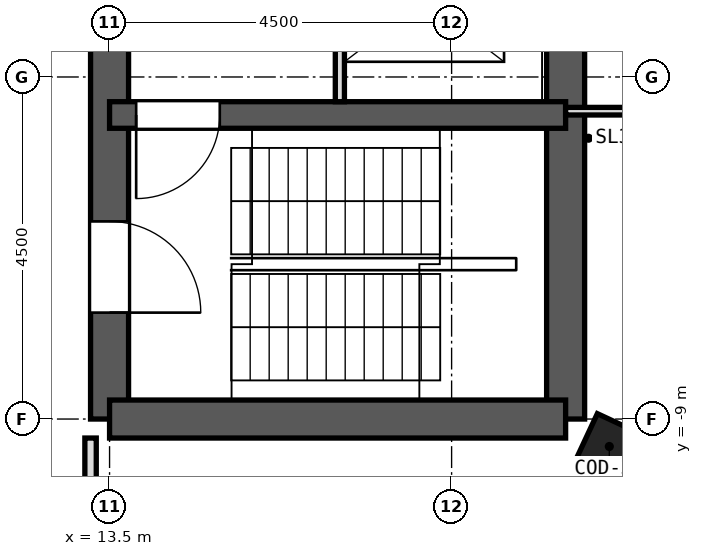
"""IFC4 building model, lengths in metres.
Left out: names, types, materials, properties, quantities, classifications, styles, units other than length and angle.
Written with IfcOpenShell. Run it as: python <this file> out.ifc"""

import sys

from ifc_helpers import new_model, si_unit, direction, frame, frame_2d, origin, origin_2d, place, context, subcontext, project, spatial, polyline, rectangle, outline, extrude, element, fill, save


model = new_model("IFC4")
c1 = context("Model", 3, precision=1e-05, world=origin(), true_north=direction((0.0, 1.0)))
c2 = subcontext(c1, "Body", "Model", "MODEL_VIEW")
j1 = project(units=[si_unit("LENGTHUNIT", "METRE"), si_unit("PLANEANGLEUNIT", "RADIAN")], contexts=[c1])
p1 = place(None, origin())
s1 = spatial("IfcSite", under=j1, at=p1, CompositionType="ELEMENT")
p2 = place(p1, origin())
s2 = spatial("IfcBuilding", under=s1, at=p2, CompositionType="ELEMENT")
p3 = place(p2, frame((0.0, 0.0, 224.7)))
s3 = spatial("IfcBuildingStorey", under=s2, at=p3, CompositionType="ELEMENT", Elevation=224.7)
p4 = place(p3, frame((20.075, -9.361, -0.55), z_axis=(0.0, 0.0, 1.0), x_axis=(0.906307787037, -0.422618261741, 0.0)))
e1 = element("IfcColumn", 1, at=p4, inside=s3, PredefinedType="COLUMN", context=c2, shape_type="SweptSolid", body=[
    extrude(rectangle(XDim=0.65, YDim=0.65, at=origin_2d()), origin(), (0.0, 0.0, 1.0), 5.55),
])
p5 = place(p3, frame((13.5, -9.0, 0.0), z_axis=(0.0, 0.0, 1.0), x_axis=(0.0, 1.0, 0.0)))
e2 = element("IfcWall", 2, at=p5, inside=s3, PredefinedType="SHEAR", context=c2, shape_type="SweptSolid", body=[
    extrude(rectangle(XDim=18.0, YDim=0.5, at=frame_2d((9.0, 0.0))), origin(), (0.0, 0.0, 1.0), 5.0),
])
p6 = place(p5, frame((15.4, 0.0, 0.0)))
e3 = element("IfcOpeningElement", 3, at=p6, cuts=e2, PredefinedType="OPENING", context=c2, shape_type="SweptSolid", body=[
    extrude(rectangle(XDim=1.2, YDim=2.1, at=frame_2d((0.6, 1.05))), frame((0.0, 0.262, 0.0), z_axis=(0.0, -1.0, 0.0), x_axis=(1.0, 0.0, 0.0)), (0.0, 0.0, 1.0), 0.524),
])
p7 = place(p5, frame((1.4, 0.0, 0.0)))
e4 = element("IfcOpeningElement", 4, at=p7, cuts=e2, PredefinedType="OPENING", context=c2, shape_type="SweptSolid", body=[
    extrude(rectangle(XDim=1.2, YDim=2.1, at=frame_2d((0.6, 1.05))), frame((0.0, 0.262, 0.0), z_axis=(0.0, -1.0, 0.0), x_axis=(1.0, 0.0, 0.0)), (0.0, 0.0, 1.0), 0.524),
])
p8 = place(p5, frame((7.5, 0.0, 0.0)))
e5 = element("IfcOpeningElement", 5, at=p8, cuts=e2, PredefinedType="OPENING", context=c2, shape_type="SweptSolid", body=[
    extrude(rectangle(XDim=3.0, YDim=2.4, at=frame_2d((1.5, 1.2))), frame((0.0, 0.262, 0.0), z_axis=(0.0, -1.0, 0.0), x_axis=(1.0, 0.0, 0.0)), (0.0, 0.0, 1.0), 0.524),
])
p9 = place(p3, frame((19.5, -9.0, 0.0), z_axis=(0.0, 0.0, 1.0), x_axis=(0.0, 1.0, 0.0)))
e6 = element("IfcWall", 6, at=p9, inside=s3, PredefinedType="SHEAR", context=c2, shape_type="SweptSolid", body=[
    extrude(rectangle(XDim=18.0, YDim=0.5, at=frame_2d((9.0, 0.0))), origin(), (0.0, 0.0, 1.0), 5.0),
])
p10 = place(p9, frame((9.45, 0.0, 0.0)))
e7 = element("IfcOpeningElement", 7, at=p10, cuts=e6, PredefinedType="OPENING", context=c2, shape_type="SweptSolid", body=[
    extrude(rectangle(XDim=0.9, YDim=2.1, at=frame_2d((0.45, 1.05))), frame((0.0, 0.262, 0.0), z_axis=(0.0, -1.0, 0.0), x_axis=(1.0, 0.0, 0.0)), (0.0, 0.0, 1.0), 0.524),
])
p11 = place(p9, frame((7.65, 0.0, 0.0)))
e8 = element("IfcOpeningElement", 8, at=p11, cuts=e6, PredefinedType="OPENING", context=c2, shape_type="SweptSolid", body=[
    extrude(rectangle(XDim=0.9, YDim=2.1, at=frame_2d((0.45, 1.05))), frame((0.0, 0.262, 0.0), z_axis=(0.0, -1.0, 0.0), x_axis=(1.0, 0.0, 0.0)), (0.0, 0.0, 1.0), 0.524),
])
p12 = place(p3, frame((13.5, -9.0, 0.0), z_axis=(0.0, 0.0, 1.0), x_axis=(1.0, 0.0, 0.0)))
e9 = element("IfcWall", 9, at=p12, inside=s3, PredefinedType="SHEAR", context=c2, shape_type="SweptSolid", body=[
    extrude(rectangle(XDim=6.0, YDim=0.5, at=frame_2d((3.0, 0.0))), origin(), (0.0, 0.0, 1.0), 5.0),
])
p13 = place(p3, frame((13.5, -5.0, 0.0), z_axis=(0.0, 0.0, 1.0), x_axis=(1.0, 0.0, 0.0)))
e10 = element("IfcWall", 10, at=p13, inside=s3, PredefinedType="SHEAR", context=c2, shape_type="SweptSolid", body=[
    extrude(rectangle(XDim=6.0, YDim=0.35, at=frame_2d((3.0, 0.0))), origin(), (0.0, 0.0, 1.0), 5.0),
])
p14 = place(p13, frame((0.35, 0.0, 0.0)))
e11 = element("IfcOpeningElement", 11, at=p14, cuts=e10, PredefinedType="OPENING", context=c2, shape_type="SweptSolid", body=[
    extrude(rectangle(XDim=1.1, YDim=2.1, at=frame_2d((0.55, 1.05))), frame((0.0, 0.187, 0.0), z_axis=(0.0, -1.0, 0.0), x_axis=(1.0, 0.0, 0.0)), (0.0, 0.0, 1.0), 0.374),
])
p15 = place(p3, origin())
e12 = element("IfcWall", 12, at=p15, inside=s3, PredefinedType="SOLIDWALL", context=c2, shape_type="SweptSolid", body=[
    extrude(outline(polyline([(20.656, -10.048), (20.975, -9.364), (20.411, -9.159), (20.507, -9.204), (20.232, -9.793), (20.136, -9.748), (20.656, -10.048)])), origin(), (0.0, 0.0, 1.0), 4.6),
])
p16 = place(p3, frame((9.077, -9.077, 0.0), z_axis=(0.0, 0.0, 1.0), x_axis=(0.707106781187, -0.707106781187, 0.0)))
e13 = element("IfcWall", 13, at=p16, inside=s3, PredefinedType="PARTITIONING", context=c2, shape_type="SweptSolid", body=[
    extrude(rectangle(XDim=5.852, YDim=0.15, at=frame_2d((2.926, 0.0))), origin(), (0.0, 0.0, 1.0), 4.6),
])
p17 = place(p16, frame((1.545, 0.0, 0.0)))
e14 = element("IfcOpeningElement", 14, at=p17, cuts=e13, PredefinedType="OPENING", context=c2, shape_type="SweptSolid", body=[
    extrude(rectangle(XDim=0.9, YDim=2.1, at=frame_2d((0.45, 1.05))), frame((0.0, 0.087, 0.0), z_axis=(0.0, -1.0, 0.0), x_axis=(1.0, 0.0, 0.0)), (0.0, 0.0, 1.0), 0.174),
])
p18 = place(p3, frame((13.25, -13.175, 0.0), z_axis=(0.0, 0.0, 1.0), x_axis=(0.0, 1.0, 0.0)))
e15 = element("IfcWall", 15, at=p18, inside=s3, PredefinedType="PARTITIONING", context=c2, shape_type="SweptSolid", body=[
    extrude(rectangle(XDim=3.925, YDim=0.15, at=frame_2d((1.962, 0.0))), origin(), (0.0, 0.0, 1.0), 4.6),
])
p19 = place(p18, frame((1.025, 0.0, 0.0)))
e16 = element("IfcOpeningElement", 16, at=p19, cuts=e15, PredefinedType="OPENING", context=c2, shape_type="SweptSolid", body=[
    extrude(rectangle(XDim=1.8, YDim=2.1, at=frame_2d((0.9, 1.05))), frame((0.0, 0.087, 0.0), z_axis=(0.0, -1.0, 0.0), x_axis=(1.0, 0.0, 0.0)), (0.0, 0.0, 1.0), 0.174),
])
p20 = place(p3, frame((19.5, -4.95, 0.0), z_axis=(0.0, 0.0, 1.0), x_axis=(1.0, 0.0, 0.0)))
e17 = element("IfcWall", 17, at=p20, inside=s3, PredefinedType="PARTITIONING", context=c2, shape_type="SweptSolid", body=[
    extrude(rectangle(XDim=2.284, YDim=0.1, at=frame_2d((1.142, 0.0))), origin(), (0.0, 0.0, 1.0), 4.6),
])
p21 = place(p3, frame((16.53, -4.825, 0.0), z_axis=(0.0, 0.0, 1.0), x_axis=(0.0, 1.0, 0.0)))
e18 = element("IfcWall", 18, at=p21, inside=s3, PredefinedType="PARTITIONING", context=c2, shape_type="SweptSolid", body=[
    extrude(rectangle(XDim=2.65, YDim=0.12, at=frame_2d((1.325, 0.0))), origin(), (0.0, 0.0, 1.0), 4.6),
])
p22 = place(p21, frame((0.775, 0.0, 0.0)))
e19 = element("IfcOpeningElement", 19, at=p22, cuts=e18, PredefinedType="OPENING", context=c2, shape_type="SweptSolid", body=[
    extrude(rectangle(XDim=1.1, YDim=2.1, at=frame_2d((0.55, 1.05))), frame((0.0, 0.072, 0.0), z_axis=(0.0, -1.0, 0.0), x_axis=(1.0, 0.0, 0.0)), (0.0, 0.0, 1.0), 0.144),
])
p23 = place(p14, frame((1.1, 0.0, 0.0), z_axis=(0.0, 0.0, 1.0), x_axis=(-1.0, 0.0, 0.0)))
e20 = element("IfcDoor", 20, at=p23, inside=s3, OperationType="SINGLE_SWING_RIGHT", PredefinedType="DOOR", context=c2, shape_type="SweptSolid", body=[
    extrude(rectangle(XDim=1.1, YDim=2.1, at=frame_2d((0.55, 1.05))), frame((0.0, 0.025, 0.0), z_axis=(0.0, -1.0, 0.0), x_axis=(1.0, 0.0, 0.0)), (0.0, 0.0, 1.0), 0.05),
])
fill(e11, e20)
p24 = place(p7, frame((1.2, 0.0, 0.0), z_axis=(0.0, 0.0, 1.0), x_axis=(-1.0, 0.0, 0.0)))
e21 = element("IfcDoor", 21, at=p24, inside=s3, OperationType="SINGLE_SWING_RIGHT", PredefinedType="DOOR", context=c2, shape_type="SweptSolid", body=[
    extrude(rectangle(XDim=1.2, YDim=2.1, at=frame_2d((0.6, 1.05))), frame((0.0, 0.025, 0.0), z_axis=(0.0, -1.0, 0.0), x_axis=(1.0, 0.0, 0.0)), (0.0, 0.0, 1.0), 0.05),
])
fill(e4, e21)
save(model, sys.argv[1])
